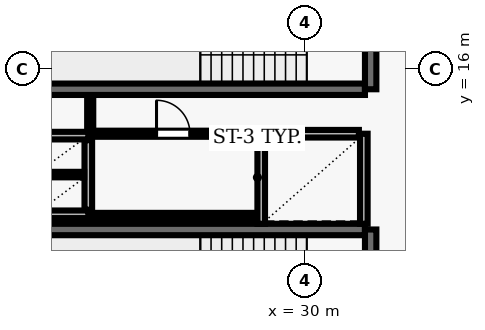
"""IFC4 building model, lengths in metres.
Left out: names, types, materials, properties, quantities, classifications, styles, units other than length and angle.
Written with IfcOpenShell. Run it as: python <this file> out.ifc"""

import sys

from ifc_helpers import new_model, si_unit, direction, frame, frame_2d, origin, place, context, subcontext, project, spatial, rectangle, extrude, element, fill, save


model = new_model("IFC4")
c1 = context("Model", 3, precision=1e-05, world=origin(), true_north=direction((0.0, 1.0)))
c2 = subcontext(c1, "Body", "Model", "MODEL_VIEW")
j1 = project(units=[si_unit("LENGTHUNIT", "METRE"), si_unit("PLANEANGLEUNIT", "RADIAN")], contexts=[c1])
p1 = place(None, origin())
s1 = spatial("IfcSite", under=j1, at=p1, CompositionType="ELEMENT")
p2 = place(p1, origin())
s2 = spatial("IfcBuilding", under=s1, at=p2, CompositionType="ELEMENT")
p3 = place(p2, frame((0.0, 0.0, 161.9)))
s3 = spatial("IfcBuildingStorey", under=s2, at=p3, CompositionType="ELEMENT", Elevation=161.9)
p4 = place(p3, frame((23.22, 15.47, 0.0), z_axis=(0.0, 0.0, 1.0), x_axis=(1.0, 0.0, 0.0)))
e1 = element("IfcWall", 1, at=p4, inside=s3, PredefinedType="SHEAR", context=c2, shape_type="SweptSolid", body=[
    extrude(rectangle(XDim=8.36, YDim=0.3, at=frame_2d((4.18, 0.0))), origin(), (0.0, 0.0, 1.0), 3.64),
])
p5 = place(p3, frame((31.73, 15.47, 0.0), z_axis=(0.0, 0.0, 1.0), x_axis=(0.0, 1.0, 0.0)))
e2 = element("IfcWall", 2, at=p5, inside=s3, PredefinedType="SHEAR", context=c2, shape_type="SweptSolid", body=[
    extrude(rectangle(XDim=3.51, YDim=0.3, at=frame_2d((1.755, 0.0))), origin(), (0.0, 0.0, 1.0), 3.64),
])
p6 = place(p5, frame((1.18, 0.0, 0.0)))
e3 = element("IfcOpeningElement", 3, at=p6, cuts=e2, PredefinedType="OPENING", context=c2, shape_type="SweptSolid", body=[
    extrude(rectangle(XDim=1.15, YDim=2.15, at=frame_2d((0.575, 1.075))), frame((0.0, 0.16, 0.0), z_axis=(0.0, -1.0, 0.0), x_axis=(1.0, 0.0, 0.0)), (0.0, 0.0, 1.0), 0.32),
])
p7 = place(p3, frame((31.58, 11.78, 0.0), z_axis=(0.0, 0.0, 1.0), x_axis=(-1.0, 0.0, 0.0)))
e4 = element("IfcWall", 4, at=p7, inside=s3, PredefinedType="SHEAR", context=c2, shape_type="SweptSolid", body=[
    extrude(rectangle(XDim=8.36, YDim=0.3, at=frame_2d((4.18, 0.0))), origin(), (0.0, 0.0, 1.0), 3.64),
])
p8 = place(p3, frame((31.73, 8.27, 0.0), z_axis=(0.0, 0.0, 1.0), x_axis=(0.0, 1.0, 0.0)))
e5 = element("IfcWall", 5, at=p8, inside=s3, PredefinedType="SHEAR", context=c2, shape_type="SweptSolid", body=[
    extrude(rectangle(XDim=3.51, YDim=0.3, at=frame_2d((1.755, 0.0))), origin(), (0.0, 0.0, 1.0), 3.64),
])
p9 = place(p8, frame((1.18, 0.0, 0.0)))
e6 = element("IfcOpeningElement", 6, at=p9, cuts=e5, PredefinedType="OPENING", context=c2, shape_type="SweptSolid", body=[
    extrude(rectangle(XDim=1.15, YDim=2.15, at=frame_2d((0.575, 1.075))), frame((0.0, 0.16, 0.0), z_axis=(0.0, -1.0, 0.0), x_axis=(1.0, 0.0, 0.0)), (0.0, 0.0, 1.0), 0.32),
])
for number, where, z_axis, x_axis in (
    (7, (28.85, 14.3, 0.0), (0.0, 0.0, 1.0), (0.0, -1.0, 0.0)),
    (8, (31.55, 11.93, 0.0), (0.0, 0.0, 1.0), (0.0, 1.0, 0.0)),
):
    element("IfcWall", number, at=place(p3, frame(where, z_axis=z_axis, x_axis=x_axis)), inside=s3, PredefinedType="SOLIDWALL", context=c2, shape_type="SweptSolid", body=[
        extrude(rectangle(XDim=2.37, YDim=0.2, at=frame_2d((1.185, 0.0))), origin(), (0.0, 0.0, 1.0), 3.64),
    ])
p10 = place(p3, frame((31.42, 14.3, 0.0), z_axis=(0.0, 0.0, 1.0), x_axis=(-1.0, 0.0, 0.0)))
e9 = element("IfcWall", 9, at=p10, inside=s3, PredefinedType="SOLIDWALL", context=c2, shape_type="SweptSolid", body=[
    extrude(rectangle(XDim=2.44, YDim=0.2, at=frame_2d((1.22, 0.0))), origin(), (0.0, 0.0, 1.0), 3.64),
])
for number, where, z_axis, x_axis in (
    (10, (22.9, 14.25, 0.0), (0.0, 0.0, 1.0), (1.0, 0.0, 0.0)),
    (11, (22.9, 12.18, 0.0), (0.0, 0.0, 1.0), (1.0, 0.0, 0.0)),
):
    element("IfcWall", number, at=place(p3, frame(where, z_axis=z_axis, x_axis=x_axis)), inside=s3, PredefinedType="SOLIDWALL", context=c2, shape_type="SweptSolid", body=[
        extrude(rectangle(XDim=1.4, YDim=0.2, at=frame_2d((0.7, 0.0))), origin(), (0.0, 0.0, 1.0), 3.64),
    ])
p11 = place(p3, frame((24.3, 12.3, 0.0), z_axis=(0.0, 0.0, 1.0), x_axis=(0.0, 1.0, 0.0)))
e12 = element("IfcWall", 12, at=p11, inside=s3, PredefinedType="SOLIDWALL", context=c2, shape_type="SweptSolid", body=[
    extrude(rectangle(XDim=1.83, YDim=0.2, at=frame_2d((0.915, 0.0))), origin(), (0.0, 0.0, 1.0), 3.64),
])
p12 = place(p3, frame((23.01, 13.225, 0.0), z_axis=(0.0, 0.0, 1.0), x_axis=(1.0, 0.0, 0.0)))
e13 = element("IfcWall", 13, at=p12, inside=s3, PredefinedType="PARTITIONING", context=c2, shape_type="SweptSolid", body=[
    extrude(rectangle(XDim=1.18, YDim=0.145, at=frame_2d((0.59, 0.0))), origin(), (0.0, 0.0, 1.0), 3.64),
])
p13 = place(p3, frame((24.35, 12.15, 0.0), z_axis=(0.0, 0.0, 1.0), x_axis=(1.0, 0.0, 0.0)))
e14 = element("IfcWall", 14, at=p13, inside=s3, PredefinedType="PARTITIONING", context=c2, shape_type="SweptSolid", body=[
    extrude(rectangle(XDim=4.37, YDim=0.135, at=frame_2d((2.185, 0.0))), origin(), (0.0, 0.0, 1.0), 3.64),
])
p14 = place(p3, frame((24.35, 14.3, 0.0), z_axis=(0.0, 0.0, 1.0), x_axis=(1.0, 0.0, 0.0)))
e15 = element("IfcWall", 15, at=p14, inside=s3, PredefinedType="PARTITIONING", context=c2, shape_type="SweptSolid", body=[
    extrude(rectangle(XDim=4.37, YDim=0.16, at=frame_2d((2.185, 0.0))), origin(), (0.0, 0.0, 1.0), 3.64),
])
p15 = place(p14, frame((1.745, 0.0, 0.0)))
e16 = element("IfcOpeningElement", 16, at=p15, cuts=e15, PredefinedType="OPENING", context=c2, shape_type="SweptSolid", body=[
    extrude(rectangle(XDim=0.88, YDim=2.1, at=frame_2d((0.44, 1.05))), frame((0.0, 0.09, 0.0), z_axis=(0.0, -1.0, 0.0), x_axis=(1.0, 0.0, 0.0)), (0.0, 0.0, 1.0), 0.18),
])
p16 = place(p3, frame((24.35, 15.29, 0.0), z_axis=(0.0, 0.0, 1.0), x_axis=(0.0, -1.0, 0.0)))
e17 = element("IfcWall", 17, at=p16, inside=s3, PredefinedType="PARTITIONING", context=c2, shape_type="SweptSolid", body=[
    extrude(rectangle(XDim=0.915, YDim=0.16, at=frame_2d((0.458, 0.0))), origin(), (0.0, 0.0, 1.0), 3.64),
])
p17 = place(p15, origin())
e18 = element("IfcDoor", 18, at=p17, inside=s3, OperationType="SINGLE_SWING_LEFT", PredefinedType="DOOR", context=c2, shape_type="SweptSolid", body=[
    extrude(rectangle(XDim=0.88, YDim=2.1, at=frame_2d((0.44, 1.05))), frame((0.0, 0.025, 0.0), z_axis=(0.0, -1.0, 0.0), x_axis=(1.0, 0.0, 0.0)), (0.0, 0.0, 1.0), 0.05),
])
fill(e16, e18)
save(model, sys.argv[1])
